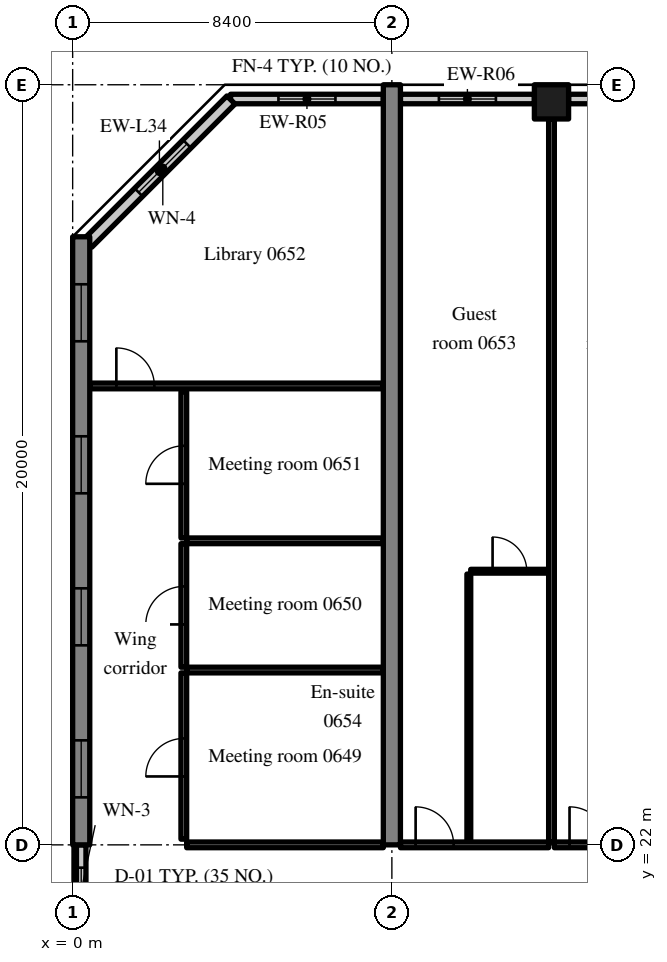
"""IFC4 building model, lengths in metres.
Left out: names, types, materials, properties, quantities, classifications, styles, units other than length and angle.
Written with IfcOpenShell. Run it as: python <this file> out.ifc"""

import sys

from ifc_helpers import new_model, si_unit, direction, frame, frame_2d, origin, origin_2d, place, context, subcontext, project, spatial, rectangle, extrude, source, transform, mapped, element, fill, save


model = new_model("IFC4")
c1 = context("Model", 3, precision=1e-05, world=origin(), true_north=direction((0.0, 1.0)))
c2 = subcontext(c1, "Body", "Model", "MODEL_VIEW")
j1 = project(units=[si_unit("LENGTHUNIT", "METRE"), si_unit("PLANEANGLEUNIT", "RADIAN")], contexts=[c1])
p1 = place(None, origin())
s1 = spatial("IfcSite", under=j1, at=p1, CompositionType="ELEMENT")
p2 = place(p1, origin())
s2 = spatial("IfcBuilding", under=s1, at=p2, CompositionType="ELEMENT")
p3 = place(p2, frame((0.0, 0.0, 31.6)))
s3 = spatial("IfcBuildingStorey", under=s2, at=p3, CompositionType="ELEMENT", Elevation=31.6)
m1 = source(origin(), c2, "Body", "SweptSolid", [
    extrude(rectangle(XDim=16.0, YDim=0.45, at=frame_2d((8.0, 0.0))), origin(), (0.0, 0.0, 1.0), 3.52),
])
p4 = place(p3, frame((0.225, 22.0, 0.0), z_axis=(0.0, 0.0, 1.0), x_axis=(0.0, 1.0, 0.0)))
e1 = element("IfcWall", 1, at=p4, inside=s3, PredefinedType="SHEAR", context=c2, shape_type="MappedRepresentation", body=[
    mapped(m1, transform((0.0, 0.0, 0.0), scale=1.0)),
])
m2 = source(origin(), c2, "Body", "SweptSolid", [
    extrude(rectangle(XDim=1.5, YDim=1.5, at=frame_2d((0.75, 0.75))), frame((0.0, 0.235, 0.0), z_axis=(0.0, -1.0, 0.0), x_axis=(1.0, 0.0, 0.0)), (0.0, 0.0, 1.0), 0.47),
])
p5 = place(p4, frame((1.25, 0.0, 0.9)))
e2 = element("IfcOpeningElement", 2, at=p5, cuts=e1, PredefinedType="OPENING", context=c2, shape_type="MappedRepresentation", body=[
    mapped(m2, transform((0.0, 0.0, 0.0), scale=1.0)),
])
p6 = place(p4, frame((5.25, 0.0, 0.9)))
e3 = element("IfcOpeningElement", 3, at=p6, cuts=e1, PredefinedType="OPENING", context=c2, shape_type="MappedRepresentation", body=[
    mapped(m2, transform((0.0, 0.0, 0.0), scale=1.0)),
])
p7 = place(p4, frame((9.25, 0.0, 0.9)))
e4 = element("IfcOpeningElement", 4, at=p7, cuts=e1, PredefinedType="OPENING", context=c2, shape_type="MappedRepresentation", body=[
    mapped(m2, transform((0.0, 0.0, 0.0), scale=1.0)),
])
p8 = place(p4, frame((13.25, 0.0, 0.9)))
e5 = element("IfcOpeningElement", 5, at=p8, cuts=e1, PredefinedType="OPENING", context=c2, shape_type="MappedRepresentation", body=[
    mapped(m2, transform((0.0, 0.0, 0.0), scale=1.0)),
])
m3 = source(origin(), c2, "Body", "SweptSolid", [
    extrude(rectangle(XDim=20.0, YDim=0.45, at=frame_2d((10.0, 0.0))), origin(), (0.0, 0.0, 1.0), 3.52),
])
p9 = place(p3, frame((8.4, 22.0, 0.0), z_axis=(0.0, 0.0, 1.0), x_axis=(0.0, 1.0, 0.0)))
e6 = element("IfcWall", 6, at=p9, inside=s3, PredefinedType="SHEAR", context=c2, shape_type="MappedRepresentation", body=[
    mapped(m3, transform((0.0, 0.0, 0.0), scale=1.0)),
])
m4 = source(origin(), c2, "Body", "SweptSolid", [
    extrude(rectangle(XDim=0.9, YDim=0.9, at=origin_2d()), origin(), (0.0, 0.0, 1.0), 3.52),
])
p10 = place(p3, frame((12.6, 41.55, 0.0), z_axis=(0.0, 0.0, 1.0), x_axis=(1.0, 0.0, 0.0)))
e7 = element("IfcColumn", 7, at=p10, inside=s3, PredefinedType="COLUMN", context=c2, shape_type="MappedRepresentation", body=[
    mapped(m4, transform((0.0, 0.0, 0.0), scale=1.0)),
])
m5 = source(origin(), c2, "Body", "SweptSolid", [
    extrude(rectangle(XDim=4.02, YDim=0.25, at=frame_2d((2.01, 0.0))), origin(), (0.0, 0.0, 1.0), 2.77),
])
p11 = place(p3, frame((8.175, 41.625, 0.0), z_axis=(0.0, 0.0, 1.0), x_axis=(-1.0, 0.0, 0.0)))
e8 = element("IfcWall", 8, at=p11, inside=s3, PredefinedType="SOLIDWALL", context=c2, shape_type="MappedRepresentation", body=[
    mapped(m5, transform((0.0, 0.0, 0.0), scale=1.0)),
])
m6 = source(origin(), c2, "Body", "SweptSolid", [
    extrude(rectangle(XDim=1.5, YDim=1.5, at=frame_2d((0.75, 0.75))), frame((0.0, 0.135, 0.0), z_axis=(0.0, -1.0, 0.0), x_axis=(1.0, 0.0, 0.0)), (0.0, 0.0, 1.0), 0.27),
])
p12 = place(p11, frame((1.26, 0.0, 0.9)))
e9 = element("IfcOpeningElement", 9, at=p12, cuts=e8, PredefinedType="OPENING", context=c2, shape_type="MappedRepresentation", body=[
    mapped(m6, transform((0.0, 0.0, 0.0), scale=1.0)),
])
m7 = source(origin(), c2, "Body", "SweptSolid", [
    extrude(rectangle(XDim=3.525, YDim=0.25, at=frame_2d((1.762, 0.0))), origin(), (0.0, 0.0, 1.0), 2.77),
])
p13 = place(p3, frame((12.15, 41.625, 0.0), z_axis=(0.0, 0.0, 1.0), x_axis=(-1.0, 0.0, 0.0)))
e10 = element("IfcWall", 10, at=p13, inside=s3, PredefinedType="SOLIDWALL", context=c2, shape_type="MappedRepresentation", body=[
    mapped(m7, transform((0.0, 0.0, 0.0), scale=1.0)),
])
p14 = place(p13, frame((1.012, 0.0, 0.9)))
e11 = element("IfcOpeningElement", 11, at=p14, cuts=e10, PredefinedType="OPENING", context=c2, shape_type="MappedRepresentation", body=[
    mapped(m6, transform((0.0, 0.0, 0.0), scale=1.0)),
])
p15 = place(p3, frame((16.575, 41.625, 0.0), z_axis=(0.0, 0.0, 1.0), x_axis=(-1.0, 0.0, 0.0)))
e12 = element("IfcWall", 12, at=p15, inside=s3, PredefinedType="SOLIDWALL", context=c2, shape_type="MappedRepresentation", body=[
    mapped(m7, transform((0.0, 0.0, 0.0), scale=1.0)),
])
p16 = place(p15, frame((1.012, 0.0, 0.9)))
e13 = element("IfcOpeningElement", 13, at=p16, cuts=e12, PredefinedType="OPENING", context=c2, shape_type="MappedRepresentation", body=[
    mapped(m6, transform((0.0, 0.0, 0.0), scale=1.0)),
])
m8 = source(origin(), c2, "Body", "SweptSolid", [
    extrude(rectangle(XDim=5.326, YDim=0.3, at=frame_2d((2.663, 0.0))), origin(), (0.0, 0.0, 1.0), 3.52),
])
p17 = place(p3, frame((4.166, 41.6, 0.0), z_axis=(0.0, 0.0, 1.0), x_axis=(-0.707106781187, -0.707106781187, 0.0)))
e14 = element("IfcWall", 14, at=p17, inside=s3, PredefinedType="SOLIDWALL", context=c2, shape_type="MappedRepresentation", body=[
    mapped(m8, transform((0.0, 0.0, 0.0), scale=1.0)),
])
m9 = source(origin(), c2, "Body", "SweptSolid", [
    extrude(rectangle(XDim=1.8, YDim=1.5, at=frame_2d((0.9, 0.75))), frame((0.0, 0.16, 0.0), z_axis=(0.0, -1.0, 0.0), x_axis=(1.0, 0.0, 0.0)), (0.0, 0.0, 1.0), 0.32),
])
p18 = place(p17, frame((1.636, 0.0, 0.9)))
e15 = element("IfcOpeningElement", 15, at=p18, cuts=e14, PredefinedType="OPENING", context=c2, shape_type="MappedRepresentation", body=[
    mapped(m9, transform((0.0, 0.0, 0.0), scale=1.0)),
])
m10 = source(origin(), c2, "Body", "SweptSolid", [
    extrude(rectangle(XDim=2.4, YDim=0.25, at=frame_2d((1.2, 0.0))), origin(), (0.0, 0.0, 1.0), 2.62),
])
p19 = place(p3, frame((0.225, 19.6, 0.0), z_axis=(0.0, 0.0, 1.0), x_axis=(0.0, 1.0, 0.0)))
e16 = element("IfcWall", 16, at=p19, inside=s3, PredefinedType="SOLIDWALL", context=c2, shape_type="MappedRepresentation", body=[
    mapped(m10, transform((0.0, 0.0, 0.0), scale=1.0)),
])
m11 = source(origin(), c2, "Body", "SweptSolid", [
    extrude(rectangle(XDim=1.2, YDim=1.5, at=frame_2d((0.6, 0.75))), frame((0.0, 0.135, 0.0), z_axis=(0.0, -1.0, 0.0), x_axis=(1.0, 0.0, 0.0)), (0.0, 0.0, 1.0), 0.27),
])
p20 = place(p19, frame((0.6, 0.0, 0.9)))
e17 = element("IfcOpeningElement", 17, at=p20, cuts=e16, PredefinedType="OPENING", context=c2, shape_type="MappedRepresentation", body=[
    mapped(m11, transform((0.0, 0.0, 0.0), scale=1.0)),
])
m12 = source(origin(), c2, "Body", "SweptSolid", [
    extrude(rectangle(XDim=5.175, YDim=0.15, at=frame_2d((2.587, 0.0))), origin(), (0.0, 0.0, 1.0), 2.82),
])
p21 = place(p3, frame((3.0, 22.0, 0.0), z_axis=(0.0, 0.0, 1.0), x_axis=(1.0, 0.0, 0.0)))
e18 = element("IfcWall", 18, at=p21, inside=s3, PredefinedType="PARTITIONING", context=c2, shape_type="MappedRepresentation", body=[
    mapped(m12, transform((0.0, 0.0, 0.0), scale=1.0)),
])
m13 = source(origin(), c2, "Body", "SweptSolid", [
    extrude(rectangle(XDim=4.375, YDim=0.15, at=frame_2d((2.188, 0.0))), origin(), (0.0, 0.0, 1.0), 3.52),
])
p22 = place(p3, frame((2.925, 22.15, 0.0), z_axis=(0.0, 0.0, 1.0), x_axis=(0.0, 1.0, 0.0)))
e19 = element("IfcWall", 19, at=p22, inside=s3, PredefinedType="PARTITIONING", context=c2, shape_type="MappedRepresentation", body=[
    mapped(m13, transform((0.0, 0.0, 0.0), scale=1.0)),
])
m14 = source(origin(), c2, "Body", "SweptSolid", [
    extrude(rectangle(XDim=1.0, YDim=2.1, at=frame_2d((0.5, 1.05))), frame((0.0, 0.085, 0.0), z_axis=(0.0, -1.0, 0.0), x_axis=(1.0, 0.0, 0.0)), (0.0, 0.0, 1.0), 0.17),
])
p23 = place(p22, frame((1.65, 0.0, 0.0)))
e20 = element("IfcOpeningElement", 20, at=p23, cuts=e19, PredefinedType="OPENING", context=c2, shape_type="MappedRepresentation", body=[
    mapped(m14, transform((0.0, 0.0, 0.0), scale=1.0)),
])
m15 = source(origin(), c2, "Body", "SweptSolid", [
    extrude(rectangle(XDim=5.175, YDim=0.15, at=frame_2d((2.587, 0.0))), origin(), (0.0, 0.0, 1.0), 3.52),
])
p24 = place(p3, frame((3.0, 26.6, 0.0), z_axis=(0.0, 0.0, 1.0), x_axis=(1.0, 0.0, 0.0)))
e21 = element("IfcWall", 21, at=p24, inside=s3, PredefinedType="PARTITIONING", context=c2, shape_type="MappedRepresentation", body=[
    mapped(m15, transform((0.0, 0.0, 0.0), scale=1.0)),
])
m16 = source(origin(), c2, "Body", "SweptSolid", [
    extrude(rectangle(XDim=3.25, YDim=0.15, at=frame_2d((1.625, 0.0))), origin(), (0.0, 0.0, 1.0), 3.52),
])
p25 = place(p3, frame((2.925, 26.675, 0.0), z_axis=(0.0, 0.0, 1.0), x_axis=(0.0, 1.0, 0.0)))
e22 = element("IfcWall", 22, at=p25, inside=s3, PredefinedType="PARTITIONING", context=c2, shape_type="MappedRepresentation", body=[
    mapped(m16, transform((0.0, 0.0, 0.0), scale=1.0)),
])
p26 = place(p25, frame((1.125, 0.0, 0.0)))
e23 = element("IfcOpeningElement", 23, at=p26, cuts=e22, PredefinedType="OPENING", context=c2, shape_type="MappedRepresentation", body=[
    mapped(m14, transform((0.0, 0.0, 0.0), scale=1.0)),
])
p27 = place(p3, frame((3.0, 30.0, 0.0), z_axis=(0.0, 0.0, 1.0), x_axis=(1.0, 0.0, 0.0)))
e24 = element("IfcWall", 24, at=p27, inside=s3, PredefinedType="PARTITIONING", context=c2, shape_type="MappedRepresentation", body=[
    mapped(m15, transform((0.0, 0.0, 0.0), scale=1.0)),
])
m17 = source(origin(), c2, "Body", "SweptSolid", [
    extrude(rectangle(XDim=3.85, YDim=0.15, at=frame_2d((1.925, 0.0))), origin(), (0.0, 0.0, 1.0), 3.52),
])
p28 = place(p3, frame((2.925, 30.075, 0.0), z_axis=(0.0, 0.0, 1.0), x_axis=(0.0, 1.0, 0.0)))
e25 = element("IfcWall", 25, at=p28, inside=s3, PredefinedType="PARTITIONING", context=c2, shape_type="MappedRepresentation", body=[
    mapped(m17, transform((0.0, 0.0, 0.0), scale=1.0)),
])
p29 = place(p28, frame((1.425, 0.0, 0.0)))
e26 = element("IfcOpeningElement", 26, at=p29, cuts=e25, PredefinedType="OPENING", context=c2, shape_type="MappedRepresentation", body=[
    mapped(m14, transform((0.0, 0.0, 0.0), scale=1.0)),
])
m18 = source(origin(), c2, "Body", "SweptSolid", [
    extrude(rectangle(XDim=7.725, YDim=0.15, at=frame_2d((3.863, 0.0))), origin(), (0.0, 0.0, 1.0), 3.52),
])
p30 = place(p3, frame((0.45, 34.075, 0.0), z_axis=(0.0, 0.0, 1.0), x_axis=(1.0, 0.0, 0.0)))
e27 = element("IfcWall", 27, at=p30, inside=s3, PredefinedType="PARTITIONING", context=c2, shape_type="MappedRepresentation", body=[
    mapped(m18, transform((0.0, 0.0, 0.0), scale=1.0)),
])
p31 = place(p30, frame((0.7, 0.0, 0.0)))
e28 = element("IfcOpeningElement", 28, at=p31, cuts=e27, PredefinedType="OPENING", context=c2, shape_type="MappedRepresentation", body=[
    mapped(m14, transform((0.0, 0.0, 0.0), scale=1.0)),
])
m19 = source(origin(), c2, "Body", "SweptSolid", [
    extrude(rectangle(XDim=7.05, YDim=0.1, at=frame_2d((3.525, 0.0))), origin(), (0.0, 0.0, 1.0), 3.52),
])
p32 = place(p3, frame((10.425, 22.075, 0.0), z_axis=(0.0, 0.0, 1.0), x_axis=(0.0, 1.0, 0.0)))
e29 = element("IfcWall", 29, at=p32, inside=s3, PredefinedType="PARTITIONING", context=c2, shape_type="MappedRepresentation", body=[
    mapped(m19, transform((0.0, 0.0, 0.0), scale=1.0)),
])
m20 = source(origin(), c2, "Body", "SweptSolid", [
    extrude(rectangle(XDim=2.05, YDim=0.1, at=frame_2d((1.025, 0.0))), origin(), (0.0, 0.0, 1.0), 3.52),
])
p33 = place(p3, frame((10.475, 29.2, 0.0), z_axis=(0.0, 0.0, 1.0), x_axis=(1.0, 0.0, 0.0)))
e30 = element("IfcWall", 30, at=p33, inside=s3, PredefinedType="PARTITIONING", context=c2, shape_type="MappedRepresentation", body=[
    mapped(m20, transform((0.0, 0.0, 0.0), scale=1.0)),
])
m21 = source(origin(), c2, "Body", "SweptSolid", [
    extrude(rectangle(XDim=0.9, YDim=2.1, at=frame_2d((0.45, 1.05))), frame((0.0, 0.06, 0.0), z_axis=(0.0, -1.0, 0.0), x_axis=(1.0, 0.0, 0.0)), (0.0, 0.0, 1.0), 0.12),
])
p34 = place(p33, frame((0.575, 0.0, 0.0)))
e31 = element("IfcOpeningElement", 31, at=p34, cuts=e30, PredefinedType="OPENING", context=c2, shape_type="MappedRepresentation", body=[
    mapped(m21, transform((0.0, 0.0, 0.0), scale=1.0)),
])
m22 = source(origin(), c2, "Body", "SweptSolid", [
    extrude(rectangle(XDim=3.9, YDim=0.15, at=frame_2d((1.95, 0.0))), origin(), (0.0, 0.0, 1.0), 2.82),
])
p35 = place(p3, frame((8.625, 22.0, 0.0), z_axis=(0.0, 0.0, 1.0), x_axis=(1.0, 0.0, 0.0)))
e32 = element("IfcWall", 32, at=p35, inside=s3, PredefinedType="PARTITIONING", context=c2, shape_type="MappedRepresentation", body=[
    mapped(m22, transform((0.0, 0.0, 0.0), scale=1.0)),
])
p36 = place(p35, frame((0.4, 0.0, 0.0)))
e33 = element("IfcOpeningElement", 33, at=p36, cuts=e32, PredefinedType="OPENING", context=c2, shape_type="MappedRepresentation", body=[
    mapped(m14, transform((0.0, 0.0, 0.0), scale=1.0)),
])
p37 = place(p3, frame((12.675, 22.0, 0.0), z_axis=(0.0, 0.0, 1.0), x_axis=(1.0, 0.0, 0.0)))
e34 = element("IfcWall", 34, at=p37, inside=s3, PredefinedType="PARTITIONING", context=c2, shape_type="MappedRepresentation", body=[
    mapped(m22, transform((0.0, 0.0, 0.0), scale=1.0)),
])
p38 = place(p37, frame((0.4, 0.0, 0.0)))
e35 = element("IfcOpeningElement", 35, at=p38, cuts=e34, PredefinedType="OPENING", context=c2, shape_type="MappedRepresentation", body=[
    mapped(m14, transform((0.0, 0.0, 0.0), scale=1.0)),
])
m23 = source(origin(), c2, "Body", "SweptSolid", [
    extrude(rectangle(XDim=19.025, YDim=0.15, at=frame_2d((9.513, 0.0))), origin(), (0.0, 0.0, 1.0), 3.52),
])
p39 = place(p3, frame((12.6, 22.075, 0.0), z_axis=(0.0, 0.0, 1.0), x_axis=(0.0, 1.0, 0.0)))
e36 = element("IfcWall", 36, at=p39, inside=s3, PredefinedType="PARTITIONING", context=c2, shape_type="MappedRepresentation", body=[
    mapped(m23, transform((0.0, 0.0, 0.0), scale=1.0)),
])
m24 = source(origin(), c2, "Body", "SweptSolid", [
    extrude(rectangle(XDim=1.5, YDim=1.5, at=frame_2d((0.75, 0.75))), frame((0.0, 0.03, 0.0), z_axis=(0.0, -1.0, 0.0), x_axis=(1.0, 0.0, 0.0)), (0.0, 0.0, 1.0), 0.06),
])
p40 = place(p12, origin())
e37 = element("IfcWindow", 37, at=p40, inside=s3, PartitioningType="SINGLE_PANEL", PredefinedType="WINDOW", context=c2, shape_type="MappedRepresentation", body=[
    mapped(m24, transform((0.0, 0.0, 0.0), scale=1.0)),
])
fill(e9, e37)
p41 = place(p14, origin())
e38 = element("IfcWindow", 38, at=p41, inside=s3, PartitioningType="SINGLE_PANEL", PredefinedType="WINDOW", context=c2, shape_type="MappedRepresentation", body=[
    mapped(m24, transform((0.0, 0.0, 0.0), scale=1.0)),
])
fill(e11, e38)
m25 = source(origin(), c2, "Body", "SweptSolid", [
    extrude(rectangle(XDim=1.8, YDim=1.5, at=frame_2d((0.9, 0.75))), frame((0.0, 0.03, 0.0), z_axis=(0.0, -1.0, 0.0), x_axis=(1.0, 0.0, 0.0)), (0.0, 0.0, 1.0), 0.06),
])
p42 = place(p18, origin())
e39 = element("IfcWindow", 39, at=p42, inside=s3, PartitioningType="SINGLE_PANEL", PredefinedType="WINDOW", context=c2, shape_type="MappedRepresentation", body=[
    mapped(m25, transform((0.0, 0.0, 0.0), scale=1.0)),
])
fill(e15, e39)
p43 = place(p5, origin())
e40 = element("IfcWindow", 40, at=p43, inside=s3, PartitioningType="SINGLE_PANEL", PredefinedType="WINDOW", context=c2, shape_type="MappedRepresentation", body=[
    mapped(m24, transform((0.0, 0.0, 0.0), scale=1.0)),
])
fill(e2, e40)
p44 = place(p6, origin())
e41 = element("IfcWindow", 41, at=p44, inside=s3, PartitioningType="SINGLE_PANEL", PredefinedType="WINDOW", context=c2, shape_type="MappedRepresentation", body=[
    mapped(m24, transform((0.0, 0.0, 0.0), scale=1.0)),
])
fill(e3, e41)
p45 = place(p7, origin())
e42 = element("IfcWindow", 42, at=p45, inside=s3, PartitioningType="SINGLE_PANEL", PredefinedType="WINDOW", context=c2, shape_type="MappedRepresentation", body=[
    mapped(m24, transform((0.0, 0.0, 0.0), scale=1.0)),
])
fill(e4, e42)
p46 = place(p8, origin())
e43 = element("IfcWindow", 43, at=p46, inside=s3, PartitioningType="SINGLE_PANEL", PredefinedType="WINDOW", context=c2, shape_type="MappedRepresentation", body=[
    mapped(m24, transform((0.0, 0.0, 0.0), scale=1.0)),
])
fill(e5, e43)
m26 = source(origin(), c2, "Body", "SweptSolid", [
    extrude(rectangle(XDim=1.2, YDim=1.5, at=frame_2d((0.6, 0.75))), frame((0.0, 0.03, 0.0), z_axis=(0.0, -1.0, 0.0), x_axis=(1.0, 0.0, 0.0)), (0.0, 0.0, 1.0), 0.06),
])
p47 = place(p20, origin())
e44 = element("IfcWindow", 44, at=p47, inside=s3, PartitioningType="SINGLE_PANEL", PredefinedType="WINDOW", context=c2, shape_type="MappedRepresentation", body=[
    mapped(m26, transform((0.0, 0.0, 0.0), scale=1.0)),
])
fill(e17, e44)
m27 = source(origin(), c2, "Body", "SweptSolid", [
    extrude(rectangle(XDim=1.0, YDim=2.1, at=frame_2d((0.5, 1.05))), frame((0.0, 0.025, 0.0), z_axis=(0.0, -1.0, 0.0), x_axis=(1.0, 0.0, 0.0)), (0.0, 0.0, 1.0), 0.05),
])
p48 = place(p23, origin())
e45 = element("IfcDoor", 45, at=p48, inside=s3, OperationType="SINGLE_SWING_LEFT", PredefinedType="DOOR", context=c2, shape_type="MappedRepresentation", body=[
    mapped(m27, transform((0.0, 0.0, 0.0), scale=1.0)),
])
fill(e20, e45)
p49 = place(p26, origin())
e46 = element("IfcDoor", 46, at=p49, inside=s3, OperationType="SINGLE_SWING_LEFT", PredefinedType="DOOR", context=c2, shape_type="MappedRepresentation", body=[
    mapped(m27, transform((0.0, 0.0, 0.0), scale=1.0)),
])
fill(e23, e46)
p50 = place(p29, origin())
e47 = element("IfcDoor", 47, at=p50, inside=s3, OperationType="SINGLE_SWING_LEFT", PredefinedType="DOOR", context=c2, shape_type="MappedRepresentation", body=[
    mapped(m27, transform((0.0, 0.0, 0.0), scale=1.0)),
])
fill(e26, e47)
p51 = place(p31, origin())
e48 = element("IfcDoor", 48, at=p51, inside=s3, OperationType="SINGLE_SWING_LEFT", PredefinedType="DOOR", context=c2, shape_type="MappedRepresentation", body=[
    mapped(m27, transform((0.0, 0.0, 0.0), scale=1.0)),
])
fill(e28, e48)
m28 = source(origin(), c2, "Body", "SweptSolid", [
    extrude(rectangle(XDim=0.9, YDim=2.1, at=frame_2d((0.45, 1.05))), frame((0.0, 0.025, 0.0), z_axis=(0.0, -1.0, 0.0), x_axis=(1.0, 0.0, 0.0)), (0.0, 0.0, 1.0), 0.05),
])
p52 = place(p34, origin())
e49 = element("IfcDoor", 49, at=p52, inside=s3, OperationType="SINGLE_SWING_LEFT", PredefinedType="DOOR", context=c2, shape_type="MappedRepresentation", body=[
    mapped(m28, transform((0.0, 0.0, 0.0), scale=1.0)),
])
fill(e31, e49)
p53 = place(p36, origin())
e50 = element("IfcDoor", 50, at=p53, inside=s3, OperationType="SINGLE_SWING_LEFT", PredefinedType="DOOR", context=c2, shape_type="MappedRepresentation", body=[
    mapped(m27, transform((0.0, 0.0, 0.0), scale=1.0)),
])
fill(e33, e50)
p54 = place(p38, origin())
e51 = element("IfcDoor", 51, at=p54, inside=s3, OperationType="SINGLE_SWING_LEFT", PredefinedType="DOOR", context=c2, shape_type="MappedRepresentation", body=[
    mapped(m27, transform((0.0, 0.0, 0.0), scale=1.0)),
])
fill(e35, e51)
save(model, sys.argv[1])
